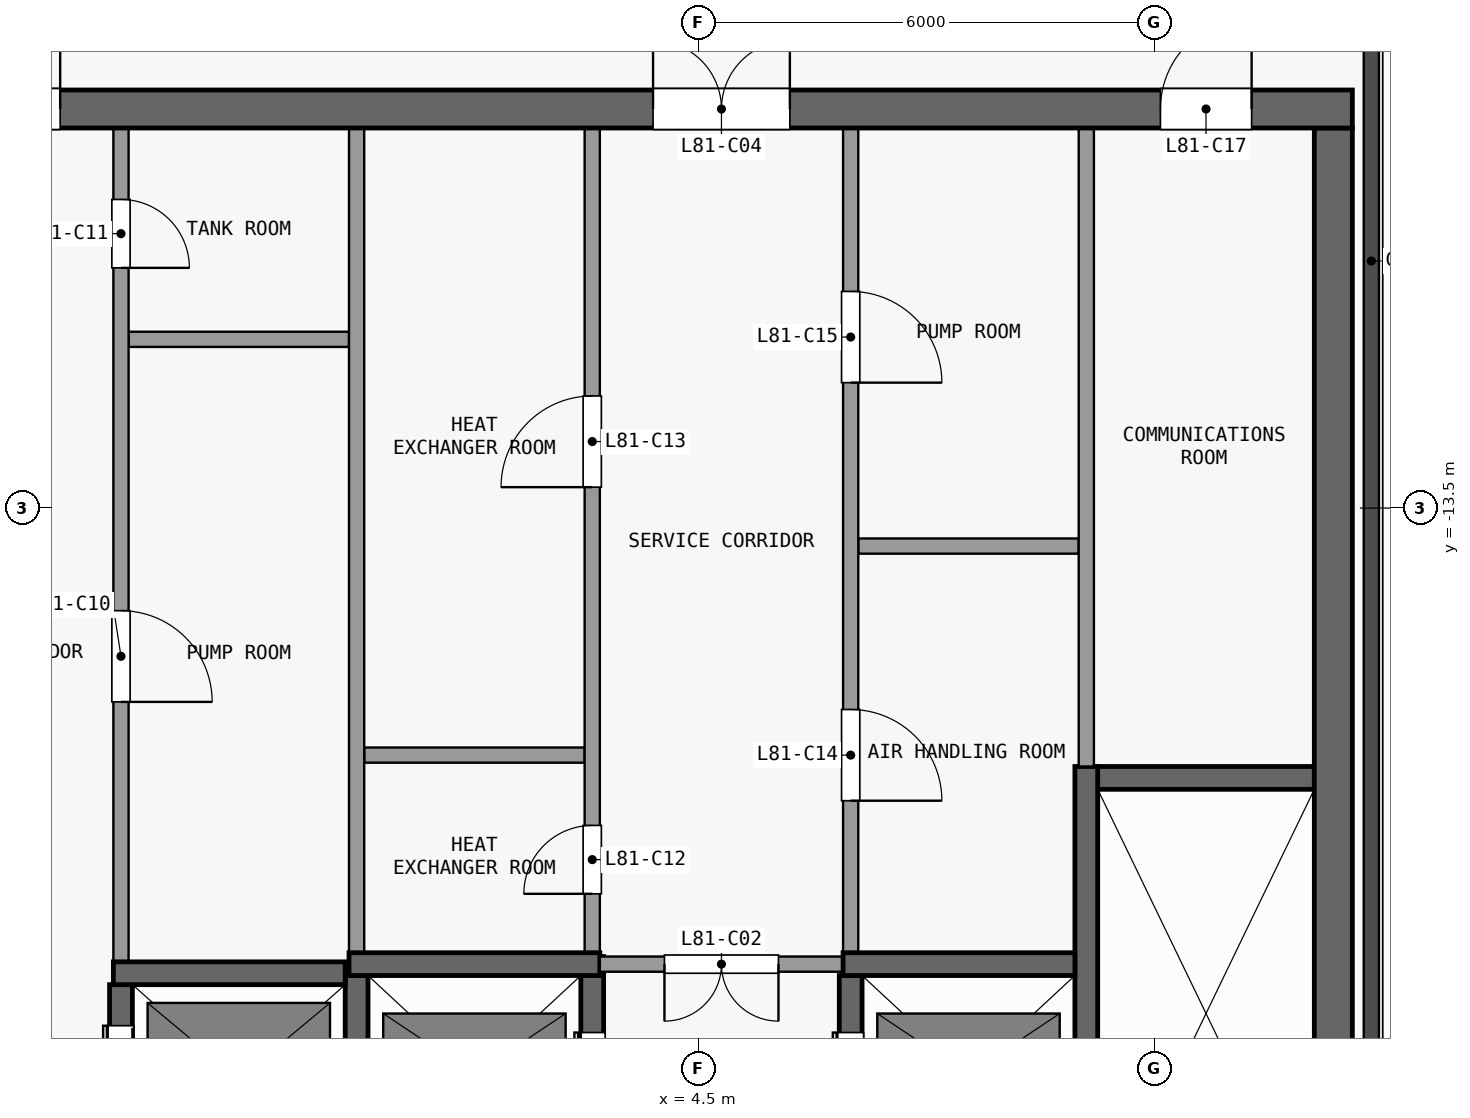
"""IFC4 building model, lengths in metres.
Left out: names, types, materials, properties, quantities, classifications, styles, units other than length and angle.
Written with IfcOpenShell. Run it as: python <this file> out.ifc"""

import sys

from ifc_helpers import new_model, si_unit, direction, frame, frame_2d, origin, place, context, subcontext, project, spatial, rectangle, extrude, element, fill, save


model = new_model("IFC4")
c1 = context("Model", 3, precision=1e-05, world=origin(), true_north=direction((0.0, 1.0)))
c2 = subcontext(c1, "Body", "Model", "MODEL_VIEW")
j1 = project(units=[si_unit("LENGTHUNIT", "METRE"), si_unit("PLANEANGLEUNIT", "RADIAN")], contexts=[c1])
p1 = place(None, origin())
s1 = spatial("IfcSite", under=j1, at=p1, CompositionType="ELEMENT")
p2 = place(p1, origin())
s2 = spatial("IfcBuilding", under=s1, at=p2, CompositionType="ELEMENT")
p3 = place(p2, frame((0.0, 0.0, 321.2)))
s3 = spatial("IfcBuildingStorey", under=s2, at=p3, CompositionType="ELEMENT", Elevation=321.2)
p4 = place(p3, frame((-13.1, -8.25, 0.0), z_axis=(0.0, 0.0, 1.0), x_axis=(1.0, 0.0, 0.0)))
e1 = element("IfcWall", 1, at=p4, inside=s3, PredefinedType="SHEAR", context=c2, shape_type="SweptSolid", body=[
    extrude(rectangle(XDim=26.2, YDim=0.5, at=frame_2d((13.1, 0.0))), origin(), (0.0, 0.0, 1.0), 4.05),
])
p5 = place(p4, frame((7.4, 0.0, 0.0)))
e2 = element("IfcOpeningElement", 2, at=p5, cuts=e1, PredefinedType="OPENING", context=c2, shape_type="SweptSolid", body=[
    extrude(rectangle(XDim=1.8, YDim=2.1, at=frame_2d((0.9, 1.05))), frame((0.0, 0.26, 0.0), z_axis=(0.0, -1.0, 0.0), x_axis=(1.0, 0.0, 0.0)), (0.0, 0.0, 1.0), 0.52),
])
p6 = place(p4, frame((17.0, 0.0, 0.0)))
e3 = element("IfcOpeningElement", 3, at=p6, cuts=e1, PredefinedType="OPENING", context=c2, shape_type="SweptSolid", body=[
    extrude(rectangle(XDim=1.8, YDim=2.1, at=frame_2d((0.9, 1.05))), frame((0.0, 0.26, 0.0), z_axis=(0.0, -1.0, 0.0), x_axis=(1.0, 0.0, 0.0)), (0.0, 0.0, 1.0), 0.52),
])
p7 = place(p4, frame((2.325, 0.0, 0.0)))
e4 = element("IfcOpeningElement", 4, at=p7, cuts=e1, PredefinedType="OPENING", context=c2, shape_type="SweptSolid", body=[
    extrude(rectangle(XDim=0.9, YDim=2.1, at=frame_2d((0.45, 1.05))), frame((0.0, 0.26, 0.0), z_axis=(0.0, -1.0, 0.0), x_axis=(1.0, 0.0, 0.0)), (0.0, 0.0, 1.0), 0.52),
])
p8 = place(p4, frame((23.675, 0.0, 0.0)))
e5 = element("IfcOpeningElement", 5, at=p8, cuts=e1, PredefinedType="OPENING", context=c2, shape_type="SweptSolid", body=[
    extrude(rectangle(XDim=1.2, YDim=2.1, at=frame_2d((0.6, 1.05))), frame((0.0, 0.26, 0.0), z_axis=(0.0, -1.0, 0.0), x_axis=(1.0, 0.0, 0.0)), (0.0, 0.0, 1.0), 0.52),
])
p9 = place(p3, frame((12.85, -24.6, 0.0), z_axis=(0.0, 0.0, 1.0), x_axis=(0.0, 1.0, 0.0)))
e6 = element("IfcWall", 6, at=p9, inside=s3, PredefinedType="SHEAR", context=c2, shape_type="SweptSolid", body=[
    extrude(rectangle(XDim=16.1, YDim=0.5, at=frame_2d((8.05, 0.0))), origin(), (0.0, 0.0, 1.0), 4.05),
])
p10 = place(p3, frame((-3.2, -19.62, 0.0), z_axis=(0.0, 0.0, 1.0), x_axis=(1.0, 0.0, 0.0)))
e7 = element("IfcWall", 7, at=p10, inside=s3, PredefinedType="SHEAR", context=c2, shape_type="SweptSolid", body=[
    extrude(rectangle(XDim=3.05, YDim=0.3, at=frame_2d((1.525, 0.0))), origin(), (0.0, 0.0, 1.0), 4.05),
])
p11 = place(p3, frame((-0.1, -19.5, 0.0), z_axis=(0.0, 0.0, 1.0), x_axis=(1.0, 0.0, 0.0)))
e8 = element("IfcWall", 8, at=p11, inside=s3, PredefinedType="SHEAR", context=c2, shape_type="SweptSolid", body=[
    extrude(rectangle(XDim=3.3, YDim=0.3, at=frame_2d((1.65, 0.0))), origin(), (0.0, 0.0, 1.0), 4.05),
])
p12 = place(p3, frame((6.4, -19.5, 0.0), z_axis=(0.0, 0.0, 1.0), x_axis=(-1.0, 0.0, 0.0)))
e9 = element("IfcWall", 9, at=p12, inside=s3, PredefinedType="PARTITIONING", context=c2, shape_type="SweptSolid", body=[
    extrude(rectangle(XDim=3.2, YDim=0.2, at=frame_2d((1.6, 0.0))), origin(), (0.0, 0.0, 1.0), 4.05),
])
p13 = place(p12, frame((0.85, 0.0, 0.0)))
e10 = element("IfcOpeningElement", 10, at=p13, cuts=e9, PredefinedType="OPENING", context=c2, shape_type="SweptSolid", body=[
    extrude(rectangle(XDim=1.5, YDim=2.1, at=frame_2d((0.75, 1.05))), frame((0.0, 0.11, 0.0), z_axis=(0.0, -1.0, 0.0), x_axis=(1.0, 0.0, 0.0)), (0.0, 0.0, 1.0), 0.22),
])
p14 = place(p3, frame((6.4, -19.5, 0.0), z_axis=(0.0, 0.0, 1.0), x_axis=(1.0, 0.0, 0.0)))
e11 = element("IfcWall", 11, at=p14, inside=s3, PredefinedType="SHEAR", context=c2, shape_type="SweptSolid", body=[
    extrude(rectangle(XDim=3.05, YDim=0.3, at=frame_2d((1.525, 0.0))), origin(), (0.0, 0.0, 1.0), 4.05),
])
p15 = place(p3, frame((9.5, -17.05, 0.0), z_axis=(0.0, 0.0, 1.0), x_axis=(1.0, 0.0, 0.0)))
e12 = element("IfcWall", 12, at=p15, inside=s3, PredefinedType="SHEAR", context=c2, shape_type="SweptSolid", body=[
    extrude(rectangle(XDim=3.1, YDim=0.3, at=frame_2d((1.55, 0.0))), origin(), (0.0, 0.0, 1.0), 4.05),
])
for number, where, z_axis, x_axis in (
    (13, (0.1, -16.75, 0.0), (0.0, 0.0, 1.0), (1.0, 0.0, 0.0)),
    (14, (6.6, -14.0, 0.0), (0.0, 0.0, 1.0), (1.0, 0.0, 0.0)),
    (15, (-3.0, -11.28, 0.0), (0.0, 0.0, 1.0), (1.0, 0.0, 0.0)),
):
    element("IfcWall", number, at=place(p3, frame(where, z_axis=z_axis, x_axis=x_axis)), inside=s3, PredefinedType="PARTITIONING", context=c2, shape_type="SweptSolid", body=[
        extrude(rectangle(XDim=2.9, YDim=0.2, at=frame_2d((1.45, 0.0))), origin(), (0.0, 0.0, 1.0), 4.05),
    ])
p16 = place(p3, frame((-3.1, -22.25, 0.0), z_axis=(0.0, 0.0, 1.0), x_axis=(0.0, 1.0, 0.0)))
e16 = element("IfcWall", 16, at=p16, inside=s3, PredefinedType="SHEAR", context=c2, shape_type="SweptSolid", body=[
    extrude(rectangle(XDim=2.48, YDim=0.3, at=frame_2d((1.24, 0.0))), origin(), (0.0, 0.0, 1.0), 4.05),
])
p17 = place(p16, frame((0.54, 0.0, 0.0)))
e17 = element("IfcOpeningElement", 17, at=p17, cuts=e16, PredefinedType="OPENING", context=c2, shape_type="SweptSolid", body=[
    extrude(rectangle(XDim=1.4, YDim=2.1, at=frame_2d((0.7, 1.05))), frame((0.0, 0.16, 0.0), z_axis=(0.0, -1.0, 0.0), x_axis=(1.0, 0.0, 0.0)), (0.0, 0.0, 1.0), 0.32),
])
p18 = place(p3, frame((-3.1, -8.5, 0.0), z_axis=(0.0, 0.0, 1.0), x_axis=(0.0, -1.0, 0.0)))
e18 = element("IfcWall", 18, at=p18, inside=s3, PredefinedType="PARTITIONING", context=c2, shape_type="SweptSolid", body=[
    extrude(rectangle(XDim=10.97, YDim=0.2, at=frame_2d((5.485, 0.0))), origin(), (0.0, 0.0, 1.0), 4.05),
])
p19 = place(p18, frame((6.35, 0.0, 0.0)))
e19 = element("IfcOpeningElement", 19, at=p19, cuts=e18, PredefinedType="OPENING", context=c2, shape_type="SweptSolid", body=[
    extrude(rectangle(XDim=1.2, YDim=2.1, at=frame_2d((0.6, 1.05))), frame((0.0, 0.11, 0.0), z_axis=(0.0, -1.0, 0.0), x_axis=(1.0, 0.0, 0.0)), (0.0, 0.0, 1.0), 0.22),
])
p20 = place(p18, frame((0.94, 0.0, 0.0)))
e20 = element("IfcOpeningElement", 20, at=p20, cuts=e18, PredefinedType="OPENING", context=c2, shape_type="SweptSolid", body=[
    extrude(rectangle(XDim=0.9, YDim=2.1, at=frame_2d((0.45, 1.05))), frame((0.0, 0.11, 0.0), z_axis=(0.0, -1.0, 0.0), x_axis=(1.0, 0.0, 0.0)), (0.0, 0.0, 1.0), 0.22),
])
p21 = place(p3, frame((0.0, -22.25, 0.0), z_axis=(0.0, 0.0, 1.0), x_axis=(0.0, 1.0, 0.0)))
e21 = element("IfcWall", 21, at=p21, inside=s3, PredefinedType="SHEAR", context=c2, shape_type="SweptSolid", body=[
    extrude(rectangle(XDim=2.6, YDim=0.3, at=frame_2d((1.3, 0.0))), origin(), (0.0, 0.0, 1.0), 4.05),
])
p22 = place(p3, frame((0.0, -19.35, 0.0), z_axis=(0.0, 0.0, 1.0), x_axis=(0.0, 1.0, 0.0)))
e22 = element("IfcWall", 22, at=p22, inside=s3, PredefinedType="PARTITIONING", context=c2, shape_type="SweptSolid", body=[
    extrude(rectangle(XDim=10.85, YDim=0.2, at=frame_2d((5.425, 0.0))), origin(), (0.0, 0.0, 1.0), 4.05),
])
p23 = place(p3, frame((3.1, -22.25, 0.0), z_axis=(0.0, 0.0, 1.0), x_axis=(0.0, 1.0, 0.0)))
e23 = element("IfcWall", 23, at=p23, inside=s3, PredefinedType="SHEAR", context=c2, shape_type="SweptSolid", body=[
    extrude(rectangle(XDim=2.85, YDim=0.3, at=frame_2d((1.425, 0.0))), origin(), (0.0, 0.0, 1.0), 4.05),
])
p24 = place(p23, frame((0.75, 0.0, 0.0)))
e24 = element("IfcOpeningElement", 24, at=p24, cuts=e23, PredefinedType="OPENING", context=c2, shape_type="SweptSolid", body=[
    extrude(rectangle(XDim=1.1, YDim=2.1, at=frame_2d((0.55, 1.05))), frame((0.0, 0.16, 0.0), z_axis=(0.0, -1.0, 0.0), x_axis=(1.0, 0.0, 0.0)), (0.0, 0.0, 1.0), 0.32),
])
p25 = place(p3, frame((3.1, -19.6, 0.0), z_axis=(0.0, 0.0, 1.0), x_axis=(0.0, 1.0, 0.0)))
e25 = element("IfcWall", 25, at=p25, inside=s3, PredefinedType="PARTITIONING", context=c2, shape_type="SweptSolid", body=[
    extrude(rectangle(XDim=11.1, YDim=0.2, at=frame_2d((5.55, 0.0))), origin(), (0.0, 0.0, 1.0), 4.05),
])
p26 = place(p25, frame((1.025, 0.0, 0.0)))
e26 = element("IfcOpeningElement", 26, at=p26, cuts=e25, PredefinedType="OPENING", context=c2, shape_type="SweptSolid", body=[
    extrude(rectangle(XDim=0.9, YDim=2.1, at=frame_2d((0.45, 1.05))), frame((0.0, 0.11, 0.0), z_axis=(0.0, -1.0, 0.0), x_axis=(1.0, 0.0, 0.0)), (0.0, 0.0, 1.0), 0.22),
])
p27 = place(p25, frame((6.375, 0.0, 0.0)))
e27 = element("IfcOpeningElement", 27, at=p27, cuts=e25, PredefinedType="OPENING", context=c2, shape_type="SweptSolid", body=[
    extrude(rectangle(XDim=1.2, YDim=2.1, at=frame_2d((0.6, 1.05))), frame((0.0, 0.11, 0.0), z_axis=(0.0, -1.0, 0.0), x_axis=(1.0, 0.0, 0.0)), (0.0, 0.0, 1.0), 0.22),
])
p28 = place(p3, frame((6.5, -22.25, 0.0), z_axis=(0.0, 0.0, 1.0), x_axis=(0.0, 1.0, 0.0)))
e28 = element("IfcWall", 28, at=p28, inside=s3, PredefinedType="SHEAR", context=c2, shape_type="SweptSolid", body=[
    extrude(rectangle(XDim=2.6, YDim=0.3, at=frame_2d((1.3, 0.0))), origin(), (0.0, 0.0, 1.0), 4.05),
])
p29 = place(p28, frame((0.75, 0.0, 0.0)))
e29 = element("IfcOpeningElement", 29, at=p29, cuts=e28, PredefinedType="OPENING", context=c2, shape_type="SweptSolid", body=[
    extrude(rectangle(XDim=1.1, YDim=2.1, at=frame_2d((0.55, 1.05))), frame((0.0, 0.16, 0.0), z_axis=(0.0, -1.0, 0.0), x_axis=(1.0, 0.0, 0.0)), (0.0, 0.0, 1.0), 0.32),
])
p30 = place(p3, frame((6.5, -8.5, 0.0), z_axis=(0.0, 0.0, 1.0), x_axis=(0.0, -1.0, 0.0)))
e30 = element("IfcWall", 30, at=p30, inside=s3, PredefinedType="PARTITIONING", context=c2, shape_type="SweptSolid", body=[
    extrude(rectangle(XDim=10.85, YDim=0.2, at=frame_2d((5.425, 0.0))), origin(), (0.0, 0.0, 1.0), 4.05),
])
p31 = place(p30, frame((7.65, 0.0, 0.0)))
e31 = element("IfcOpeningElement", 31, at=p31, cuts=e30, PredefinedType="OPENING", context=c2, shape_type="SweptSolid", body=[
    extrude(rectangle(XDim=1.2, YDim=2.1, at=frame_2d((0.6, 1.05))), frame((0.0, 0.11, 0.0), z_axis=(0.0, -1.0, 0.0), x_axis=(1.0, 0.0, 0.0)), (0.0, 0.0, 1.0), 0.22),
])
p32 = place(p30, frame((2.15, 0.0, 0.0)))
e32 = element("IfcOpeningElement", 32, at=p32, cuts=e30, PredefinedType="OPENING", context=c2, shape_type="SweptSolid", body=[
    extrude(rectangle(XDim=1.2, YDim=2.1, at=frame_2d((0.6, 1.05))), frame((0.0, 0.11, 0.0), z_axis=(0.0, -1.0, 0.0), x_axis=(1.0, 0.0, 0.0)), (0.0, 0.0, 1.0), 0.22),
])
p33 = place(p3, frame((9.6, -16.9, 0.0), z_axis=(0.0, 0.0, 1.0), x_axis=(0.0, -1.0, 0.0)))
e33 = element("IfcWall", 33, at=p33, inside=s3, PredefinedType="SHEAR", context=c2, shape_type="SweptSolid", body=[
    extrude(rectangle(XDim=7.7, YDim=0.3, at=frame_2d((3.85, 0.0))), origin(), (0.0, 0.0, 1.0), 4.05),
])
p34 = place(p33, frame((6.5, 0.0, 0.0)))
e34 = element("IfcOpeningElement", 34, at=p34, cuts=e33, PredefinedType="OPENING", context=c2, shape_type="SweptSolid", body=[
    extrude(rectangle(XDim=1.1, YDim=2.1, at=frame_2d((0.55, 1.05))), frame((0.0, 0.16, 0.0), z_axis=(0.0, -1.0, 0.0), x_axis=(1.0, 0.0, 0.0)), (0.0, 0.0, 1.0), 0.32),
])
p35 = place(p3, frame((9.6, -16.9, 0.0), z_axis=(0.0, 0.0, 1.0), x_axis=(0.0, 1.0, 0.0)))
e35 = element("IfcWall", 35, at=p35, inside=s3, PredefinedType="PARTITIONING", context=c2, shape_type="SweptSolid", body=[
    extrude(rectangle(XDim=8.4, YDim=0.2, at=frame_2d((4.2, 0.0))), origin(), (0.0, 0.0, 1.0), 4.05),
])
p36 = place(p24, origin())
e36 = element("IfcDoor", 36, at=p36, inside=s3, OperationType="DOUBLE_DOOR_SLIDING", PredefinedType="DOOR", context=c2, shape_type="SweptSolid", body=[
    extrude(rectangle(XDim=1.1, YDim=2.1, at=frame_2d((0.55, 1.05))), frame((0.0, 0.025, 0.0), z_axis=(0.0, -1.0, 0.0), x_axis=(1.0, 0.0, 0.0)), (0.0, 0.0, 1.0), 0.05),
])
fill(e24, e36)
p37 = place(p29, origin())
e37 = element("IfcDoor", 37, at=p37, inside=s3, OperationType="DOUBLE_DOOR_SLIDING", PredefinedType="DOOR", context=c2, shape_type="SweptSolid", body=[
    extrude(rectangle(XDim=1.1, YDim=2.1, at=frame_2d((0.55, 1.05))), frame((0.0, 0.025, 0.0), z_axis=(0.0, -1.0, 0.0), x_axis=(1.0, 0.0, 0.0)), (0.0, 0.0, 1.0), 0.05),
])
fill(e29, e37)
p38 = place(p17, origin())
e38 = element("IfcDoor", 38, at=p38, inside=s3, OperationType="DOUBLE_DOOR_SLIDING", PredefinedType="DOOR", context=c2, shape_type="SweptSolid", body=[
    extrude(rectangle(XDim=1.4, YDim=2.1, at=frame_2d((0.7, 1.05))), frame((0.0, 0.025, 0.0), z_axis=(0.0, -1.0, 0.0), x_axis=(1.0, 0.0, 0.0)), (0.0, 0.0, 1.0), 0.05),
])
fill(e17, e38)
p39 = place(p13, origin())
e39 = element("IfcDoor", 39, at=p39, inside=s3, OperationType="DOUBLE_DOOR_SINGLE_SWING", PredefinedType="DOOR", context=c2, shape_type="SweptSolid", body=[
    extrude(rectangle(XDim=1.5, YDim=2.1, at=frame_2d((0.75, 1.05))), frame((0.0, 0.025, 0.0), z_axis=(0.0, -1.0, 0.0), x_axis=(1.0, 0.0, 0.0)), (0.0, 0.0, 1.0), 0.05),
])
fill(e10, e39)
p40 = place(p5, origin())
e40 = element("IfcDoor", 40, at=p40, inside=s3, OperationType="DOUBLE_DOOR_SINGLE_SWING", PredefinedType="DOOR", context=c2, shape_type="SweptSolid", body=[
    extrude(rectangle(XDim=1.8, YDim=2.1, at=frame_2d((0.9, 1.05))), frame((0.0, 0.025, 0.0), z_axis=(0.0, -1.0, 0.0), x_axis=(1.0, 0.0, 0.0)), (0.0, 0.0, 1.0), 0.05),
])
fill(e2, e40)
p41 = place(p6, origin())
e41 = element("IfcDoor", 41, at=p41, inside=s3, OperationType="DOUBLE_DOOR_SINGLE_SWING", PredefinedType="DOOR", context=c2, shape_type="SweptSolid", body=[
    extrude(rectangle(XDim=1.8, YDim=2.1, at=frame_2d((0.9, 1.05))), frame((0.0, 0.025, 0.0), z_axis=(0.0, -1.0, 0.0), x_axis=(1.0, 0.0, 0.0)), (0.0, 0.0, 1.0), 0.05),
])
fill(e3, e41)
p42 = place(p19, origin())
e42 = element("IfcDoor", 42, at=p42, inside=s3, OperationType="SINGLE_SWING_RIGHT", PredefinedType="DOOR", context=c2, shape_type="SweptSolid", body=[
    extrude(rectangle(XDim=1.2, YDim=2.1, at=frame_2d((0.6, 1.05))), frame((0.0, 0.025, 0.0), z_axis=(0.0, -1.0, 0.0), x_axis=(1.0, 0.0, 0.0)), (0.0, 0.0, 1.0), 0.05),
])
fill(e19, e42)
p43 = place(p20, origin())
e43 = element("IfcDoor", 43, at=p43, inside=s3, OperationType="SINGLE_SWING_RIGHT", PredefinedType="DOOR", context=c2, shape_type="SweptSolid", body=[
    extrude(rectangle(XDim=0.9, YDim=2.1, at=frame_2d((0.45, 1.05))), frame((0.0, 0.025, 0.0), z_axis=(0.0, -1.0, 0.0), x_axis=(1.0, 0.0, 0.0)), (0.0, 0.0, 1.0), 0.05),
])
fill(e20, e43)
p44 = place(p26, origin())
e44 = element("IfcDoor", 44, at=p44, inside=s3, OperationType="SINGLE_SWING_LEFT", PredefinedType="DOOR", context=c2, shape_type="SweptSolid", body=[
    extrude(rectangle(XDim=0.9, YDim=2.1, at=frame_2d((0.45, 1.05))), frame((0.0, 0.025, 0.0), z_axis=(0.0, -1.0, 0.0), x_axis=(1.0, 0.0, 0.0)), (0.0, 0.0, 1.0), 0.05),
])
fill(e26, e44)
p45 = place(p27, origin())
e45 = element("IfcDoor", 45, at=p45, inside=s3, OperationType="SINGLE_SWING_LEFT", PredefinedType="DOOR", context=c2, shape_type="SweptSolid", body=[
    extrude(rectangle(XDim=1.2, YDim=2.1, at=frame_2d((0.6, 1.05))), frame((0.0, 0.025, 0.0), z_axis=(0.0, -1.0, 0.0), x_axis=(1.0, 0.0, 0.0)), (0.0, 0.0, 1.0), 0.05),
])
fill(e27, e45)
p46 = place(p31, origin())
e46 = element("IfcDoor", 46, at=p46, inside=s3, OperationType="SINGLE_SWING_RIGHT", PredefinedType="DOOR", context=c2, shape_type="SweptSolid", body=[
    extrude(rectangle(XDim=1.2, YDim=2.1, at=frame_2d((0.6, 1.05))), frame((0.0, 0.025, 0.0), z_axis=(0.0, -1.0, 0.0), x_axis=(1.0, 0.0, 0.0)), (0.0, 0.0, 1.0), 0.05),
])
fill(e31, e46)
p47 = place(p32, origin())
e47 = element("IfcDoor", 47, at=p47, inside=s3, OperationType="SINGLE_SWING_RIGHT", PredefinedType="DOOR", context=c2, shape_type="SweptSolid", body=[
    extrude(rectangle(XDim=1.2, YDim=2.1, at=frame_2d((0.6, 1.05))), frame((0.0, 0.025, 0.0), z_axis=(0.0, -1.0, 0.0), x_axis=(1.0, 0.0, 0.0)), (0.0, 0.0, 1.0), 0.05),
])
fill(e32, e47)
p48 = place(p8, origin())
e48 = element("IfcDoor", 48, at=p48, inside=s3, OperationType="SINGLE_SWING_RIGHT", PredefinedType="DOOR", context=c2, shape_type="SweptSolid", body=[
    extrude(rectangle(XDim=1.2, YDim=2.1, at=frame_2d((0.6, 1.05))), frame((0.0, 0.025, 0.0), z_axis=(0.0, -1.0, 0.0), x_axis=(1.0, 0.0, 0.0)), (0.0, 0.0, 1.0), 0.05),
])
fill(e5, e48)
save(model, sys.argv[1])
